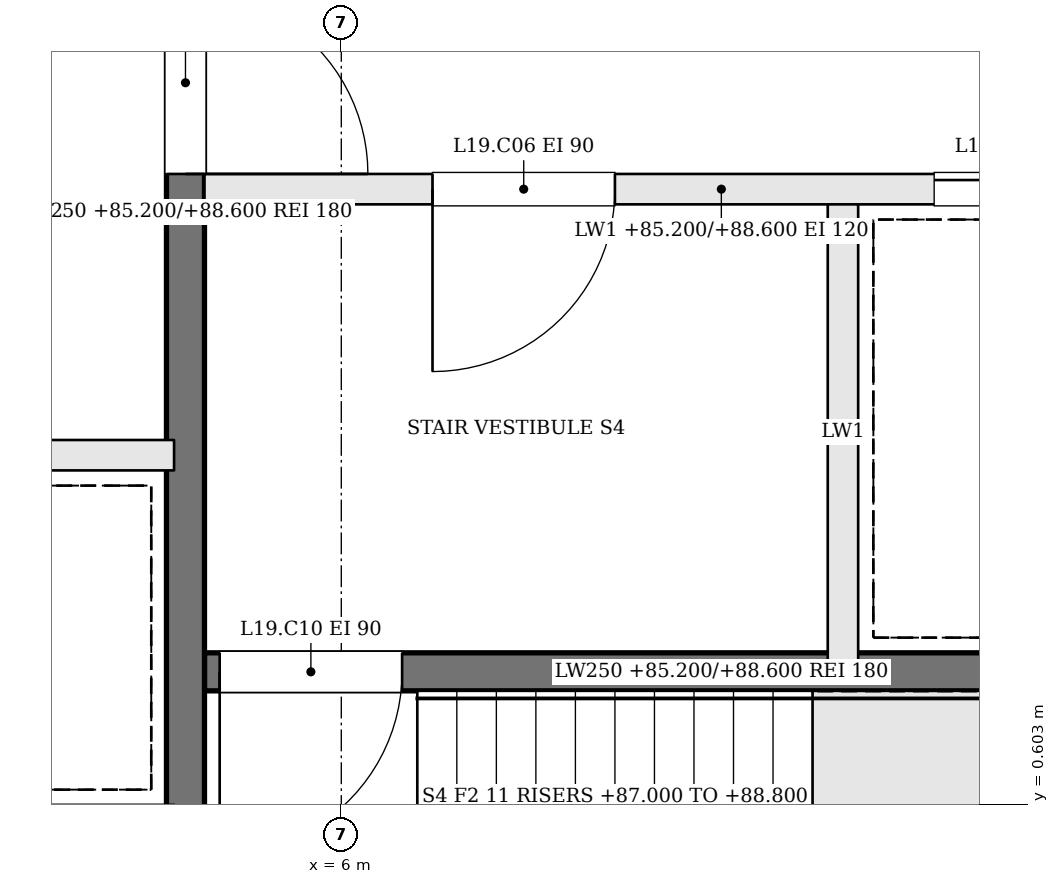
"""IFC4 building model, lengths in metres.
Left out: names, types, materials, properties, quantities, classifications, styles, units other than length and angle.
Written with IfcOpenShell. Run it as: python <this file> out.ifc"""

import sys

from ifc_helpers import new_model, si_unit, direction, frame, frame_2d, origin, place, context, subcontext, project, spatial, rectangle, extrude, element, fill, save


model = new_model("IFC4")
c1 = context("Model", 3, precision=1e-05, world=origin(), true_north=direction((0.0, 1.0)))
c2 = subcontext(c1, "Body", "Model", "MODEL_VIEW")
j1 = project(units=[si_unit("LENGTHUNIT", "METRE"), si_unit("PLANEANGLEUNIT", "RADIAN")], contexts=[c1])
p1 = place(None, origin())
s1 = spatial("IfcSite", under=j1, at=p1, CompositionType="ELEMENT")
p2 = place(p1, origin())
s2 = spatial("IfcBuilding", under=s1, at=p2, CompositionType="ELEMENT")
p3 = place(p2, frame((0.0, 0.0, 85.2)))
s3 = spatial("IfcBuildingStorey", under=s2, at=p3, CompositionType="ELEMENT", Elevation=85.2)
p4 = place(p3, frame((11.9, 4.65, 0.0), z_axis=(0.0, 0.0, 1.0), x_axis=(-1.0, 0.0, 0.0)))
e1 = element("IfcWall", 1, at=p4, inside=s3, PredefinedType="SOLIDWALL", context=c2, shape_type="SweptSolid", body=[
    extrude(rectangle(XDim=6.8, YDim=0.2, at=frame_2d((3.4, 0.0))), origin(), (0.0, 0.0, 1.0), 3.4),
])
p5 = place(p4, frame((4.1, 0.0, 0.0)))
e2 = element("IfcOpeningElement", 2, at=p5, cuts=e1, PredefinedType="OPENING", context=c2, shape_type="SweptSolid", body=[
    extrude(rectangle(XDim=1.2, YDim=2.1, at=frame_2d((0.6, 1.05))), frame((0.0, 0.11, 0.0), z_axis=(0.0, -1.0, 0.0), x_axis=(1.0, 0.0, 0.0)), (0.0, 0.0, 1.0), 0.22),
])
p6 = place(p4, frame((0.8, 0.0, 0.0)))
e3 = element("IfcOpeningElement", 3, at=p6, cuts=e1, PredefinedType="OPENING", context=c2, shape_type="SweptSolid", body=[
    extrude(rectangle(XDim=1.2, YDim=2.1, at=frame_2d((0.6, 1.05))), frame((0.0, 0.11, 0.0), z_axis=(0.0, -1.0, 0.0), x_axis=(1.0, 0.0, 0.0)), (0.0, 0.0, 1.0), 0.22),
])
p7 = place(p3, frame((11.9, 1.475, 0.0), z_axis=(0.0, 0.0, 1.0), x_axis=(-1.0, 0.0, 0.0)))
e4 = element("IfcWall", 4, at=p7, inside=s3, PredefinedType="SOLIDWALL", context=c2, shape_type="SweptSolid", body=[
    extrude(rectangle(XDim=6.8, YDim=0.25, at=frame_2d((3.4, 0.0))), origin(), (0.0, 0.0, 1.0), 3.4),
])
p8 = place(p7, frame((5.5, 0.0, 0.0)))
e5 = element("IfcOpeningElement", 5, at=p8, cuts=e4, PredefinedType="OPENING", context=c2, shape_type="SweptSolid", body=[
    extrude(rectangle(XDim=1.2, YDim=2.1, at=frame_2d((0.6, 1.05))), frame((0.0, 0.135, 0.0), z_axis=(0.0, -1.0, 0.0), x_axis=(1.0, 0.0, 0.0)), (0.0, 0.0, 1.0), 0.27),
])
p9 = place(p3, frame((9.3, 4.55, 0.0), z_axis=(0.0, 0.0, 1.0), x_axis=(0.0, -1.0, 0.0)))
e6 = element("IfcWall", 6, at=p9, inside=s3, PredefinedType="SOLIDWALL", context=c2, shape_type="SweptSolid", body=[
    extrude(rectangle(XDim=3.0, YDim=0.2, at=frame_2d((1.5, 0.0))), origin(), (0.0, 0.0, 1.0), 3.4),
])
p10 = place(p3, frame((4.975, 10.9, 0.0), z_axis=(0.0, 0.0, 1.0), x_axis=(0.0, -1.0, 0.0)))
e7 = element("IfcWall", 7, at=p10, inside=s3, PredefinedType="SOLIDWALL", context=c2, shape_type="SweptSolid", body=[
    extrude(rectangle(XDim=12.8, YDim=0.25, at=frame_2d((6.4, 0.0))), origin(), (0.0, 0.0, 1.0), 3.4),
])
p11 = place(p10, frame((4.95, 0.0, 0.0)))
e8 = element("IfcOpeningElement", 8, at=p11, cuts=e7, PredefinedType="OPENING", context=c2, shape_type="SweptSolid", body=[
    extrude(rectangle(XDim=1.2, YDim=2.1, at=frame_2d((0.6, 1.05))), frame((0.0, 0.135, 0.0), z_axis=(0.0, -1.0, 0.0), x_axis=(1.0, 0.0, 0.0)), (0.0, 0.0, 1.0), 0.27),
])
p12 = place(p3, frame((-4.9, 2.9, 0.0), z_axis=(0.0, 0.0, 1.0), x_axis=(1.0, 0.0, 0.0)))
e9 = element("IfcWall", 9, at=p12, inside=s3, PredefinedType="SOLIDWALL", context=c2, shape_type="SweptSolid", body=[
    extrude(rectangle(XDim=9.8, YDim=0.2, at=frame_2d((4.9, 0.0))), origin(), (0.0, 0.0, 1.0), 3.4),
])
p13 = place(p12, frame((0.675, 0.0, 0.0)))
e10 = element("IfcOpeningElement", 10, at=p13, cuts=e9, PredefinedType="OPENING", context=c2, shape_type="SweptSolid", body=[
    extrude(rectangle(XDim=1.1, YDim=2.1, at=frame_2d((0.55, 1.05))), frame((0.0, 0.11, 0.0), z_axis=(0.0, -1.0, 0.0), x_axis=(1.0, 0.0, 0.0)), (0.0, 0.0, 1.0), 0.22),
])
p14 = place(p12, frame((3.125, 0.0, 0.0)))
e11 = element("IfcOpeningElement", 11, at=p14, cuts=e9, PredefinedType="OPENING", context=c2, shape_type="SweptSolid", body=[
    extrude(rectangle(XDim=1.1, YDim=2.1, at=frame_2d((0.55, 1.05))), frame((0.0, 0.11, 0.0), z_axis=(0.0, -1.0, 0.0), x_axis=(1.0, 0.0, 0.0)), (0.0, 0.0, 1.0), 0.22),
])
p15 = place(p11, origin())
e12 = element("IfcDoor", 12, at=p15, inside=s3, OperationType="SINGLE_SWING_RIGHT", PredefinedType="DOOR", context=c2, shape_type="SweptSolid", body=[
    extrude(rectangle(XDim=1.2, YDim=2.1, at=frame_2d((0.6, 1.05))), frame((0.0, 0.025, 0.0), z_axis=(0.0, -1.0, 0.0), x_axis=(1.0, 0.0, 0.0)), (0.0, 0.0, 1.0), 0.05),
])
fill(e8, e12)
p16 = place(p5, origin())
e13 = element("IfcDoor", 13, at=p16, inside=s3, OperationType="SINGLE_SWING_RIGHT", PredefinedType="DOOR", context=c2, shape_type="SweptSolid", body=[
    extrude(rectangle(XDim=1.2, YDim=2.1, at=frame_2d((0.6, 1.05))), frame((0.0, 0.025, 0.0), z_axis=(0.0, -1.0, 0.0), x_axis=(1.0, 0.0, 0.0)), (0.0, 0.0, 1.0), 0.05),
])
fill(e2, e13)
p17 = place(p8, origin())
e14 = element("IfcDoor", 14, at=p17, inside=s3, OperationType="SINGLE_SWING_RIGHT", PredefinedType="DOOR", context=c2, shape_type="SweptSolid", body=[
    extrude(rectangle(XDim=1.2, YDim=2.1, at=frame_2d((0.6, 1.05))), frame((0.0, 0.025, 0.0), z_axis=(0.0, -1.0, 0.0), x_axis=(1.0, 0.0, 0.0)), (0.0, 0.0, 1.0), 0.05),
])
fill(e5, e14)
p18 = place(p6, origin())
e15 = element("IfcDoor", 15, at=p18, inside=s3, OperationType="SLIDING_TO_RIGHT", PredefinedType="DOOR", context=c2, shape_type="SweptSolid", body=[
    extrude(rectangle(XDim=1.2, YDim=2.1, at=frame_2d((0.6, 1.05))), frame((0.0, 0.025, 0.0), z_axis=(0.0, -1.0, 0.0), x_axis=(1.0, 0.0, 0.0)), (0.0, 0.0, 1.0), 0.05),
])
fill(e3, e15)
save(model, sys.argv[1])
